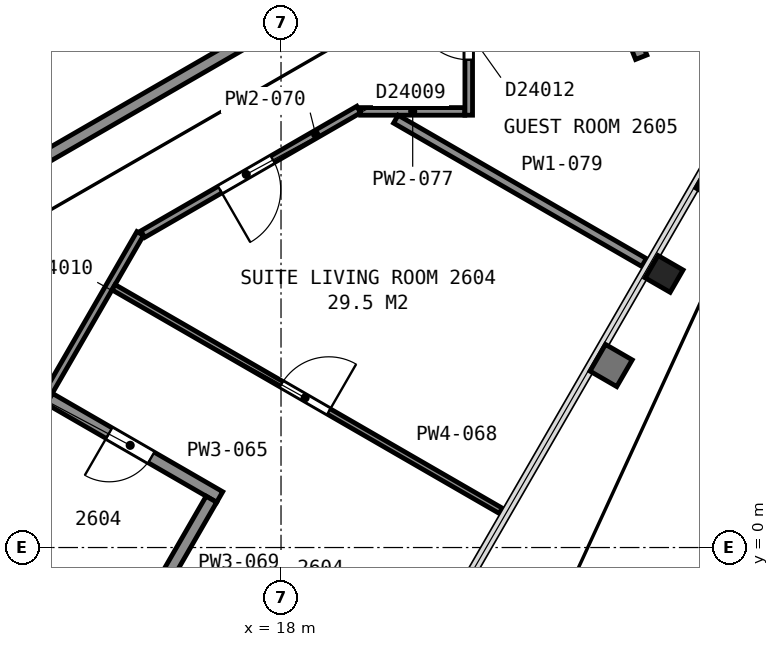
"""IFC4 building model, lengths in metres.
Left out: names, types, materials, properties, quantities, classifications, styles, units other than length and angle.
Written with IfcOpenShell. Run it as: python <this file> out.ifc"""

import sys

from ifc_helpers import new_model, si_unit, direction, frame, frame_2d, origin, origin_2d, place, context, subcontext, project, spatial, rectangle, i_section, extrude, element, fill, save


model = new_model("IFC4")
c1 = context("Model", 3, precision=1e-05, world=origin(), true_north=direction((0.0, 1.0)))
c2 = subcontext(c1, "Body", "Model", "MODEL_VIEW")
j1 = project(units=[si_unit("LENGTHUNIT", "METRE"), si_unit("PLANEANGLEUNIT", "RADIAN")], contexts=[c1])
p1 = place(None, origin())
s1 = spatial("IfcSite", under=j1, at=p1, CompositionType="ELEMENT")
p2 = place(p1, origin())
s2 = spatial("IfcBuilding", under=s1, at=p2, CompositionType="ELEMENT")
p3 = place(p2, frame((0.0, 0.0, 110.8)))
s3 = spatial("IfcBuildingStorey", under=s2, at=p3, CompositionType="ELEMENT", Elevation=110.8)
p4 = place(p3, frame((24.3, 4.5, 0.0), z_axis=(0.0, 0.0, 1.0), x_axis=(-0.5, -0.866025403784, 0.0)))
e1 = element("IfcColumn", 1, at=p4, inside=s3, PredefinedType="COLUMN", context=c2, shape_type="SweptSolid", body=[
    extrude(i_section(OverallWidth=0.424, OverallDepth=0.475, WebThickness=0.048, FlangeThickness=0.077, FilletRadius=0.015, at=origin_2d()), origin(), (0.0, 0.0, 1.0), 3.6),
])
for number, where, z_axis, x_axis in (
    (2, (6.178, 5.299, 0.0), (0.0, 0.0, 1.0), (0.866, 0.5, 0.0)),
    (3, (7.678, 2.701, 0.0), (0.0, 0.0, 1.0), (0.866, 0.5, 0.0)),
):
    element("IfcWall", number, at=place(p3, frame(where, z_axis=z_axis, x_axis=x_axis)), inside=s3, PredefinedType="PARTITIONING", context=c2, shape_type="SweptSolid", body=[
        extrude(rectangle(XDim=12.0, YDim=0.2, at=frame_2d((6.0, 0.0))), origin(), (0.0, 0.0, 1.0), 3.35),
    ])
p5 = place(p3, frame((15.684, 5.165, 0.0), z_axis=(0.0, 0.0, 1.0), x_axis=(-0.500027787016, -0.866009360349, 0.0)))
e4 = element("IfcWall", 4, at=p5, inside=s3, PredefinedType="PARTITIONING", context=c2, shape_type="SweptSolid", body=[
    extrude(rectangle(XDim=23.856, YDim=0.125, at=frame_2d((11.928, 0.0))), origin(), (0.0, 0.0, 1.0), 2.613),
])
p6 = place(p5, frame((16.996, 0.0, 0.0)))
e5 = element("IfcOpeningElement", 5, at=p6, cuts=e4, PredefinedType="OPENING", context=c2, shape_type="SweptSolid", body=[
    extrude(rectangle(XDim=1.0, YDim=2.1, at=frame_2d((0.5, 1.05))), frame((0.0, 0.073, 0.0), z_axis=(0.0, -1.0, 0.0), x_axis=(1.0, 0.0, 0.0)), (0.0, 0.0, 1.0), 0.145),
])
p7 = place(p5, frame((12.28, 0.0, 0.0)))
e6 = element("IfcOpeningElement", 6, at=p7, cuts=e4, PredefinedType="OPENING", context=c2, shape_type="SweptSolid", body=[
    extrude(rectangle(XDim=1.0, YDim=2.1, at=frame_2d((0.5, 1.05))), frame((0.0, 0.073, 0.0), z_axis=(0.0, -1.0, 0.0), x_axis=(1.0, 0.0, 0.0)), (0.0, 0.0, 1.0), 0.145),
])
p8 = place(p3, frame((12.893, 0.195, 0.0), z_axis=(0.0, 0.0, 1.0), x_axis=(0.865995225926, -0.500052265941, 0.0)))
e7 = element("IfcWall", 7, at=p8, inside=s3, PredefinedType="PARTITIONING", context=c2, shape_type="SweptSolid", body=[
    extrude(rectangle(XDim=7.347, YDim=0.15, at=frame_2d((3.674, 0.0))), origin(), (0.0, 0.0, 1.0), 2.613),
])
p9 = place(p3, frame((16.992, 0.831, 0.0), z_axis=(0.0, 0.0, 1.0), x_axis=(-0.866022073929, 0.500005767435, 0.0)))
e8 = element("IfcWall", 8, at=p9, inside=s3, PredefinedType="PARTITIONING", context=c2, shape_type="SweptSolid", body=[
    extrude(rectangle(XDim=3.232, YDim=0.2, at=frame_2d((1.616, 0.0))), origin(), (0.0, 0.0, 1.0), 2.613),
])
p10 = place(p9, frame((1.3, 0.0, 0.0)))
e9 = element("IfcOpeningElement", 9, at=p10, cuts=e8, PredefinedType="OPENING", context=c2, shape_type="SweptSolid", body=[
    extrude(rectangle(XDim=0.8, YDim=2.1, at=frame_2d((0.4, 1.05))), frame((0.0, 0.11, 0.0), z_axis=(0.0, -1.0, 0.0), x_axis=(1.0, 0.0, 0.0)), (0.0, 0.0, 1.0), 0.22),
])
p11 = place(p3, frame((21.613, 0.605, 0.0), z_axis=(0.0, 0.0, 1.0), x_axis=(-0.866021344046, 0.500007031608, 0.0)))
e10 = element("IfcWall", 10, at=p11, inside=s3, PredefinedType="PARTITIONING", context=c2, shape_type="SweptSolid", body=[
    extrude(rectangle(XDim=7.352, YDim=0.1, at=frame_2d((3.676, 0.0))), origin(), (0.0, 0.0, 1.0), 2.613),
])
p12 = place(p11, frame((3.264, 0.0, 0.0)))
e11 = element("IfcOpeningElement", 11, at=p12, cuts=e10, PredefinedType="OPENING", context=c2, shape_type="SweptSolid", body=[
    extrude(rectangle(XDim=0.9, YDim=2.1, at=frame_2d((0.45, 1.05))), frame((0.0, 0.06, 0.0), z_axis=(0.0, -1.0, 0.0), x_axis=(1.0, 0.0, 0.0)), (0.0, 0.0, 1.0), 0.12),
])
p13 = place(p3, frame((15.646, -1.302, 0.0), z_axis=(0.0, 0.0, 1.0), x_axis=(0.499719542643, 0.866187265377, 0.0)))
e12 = element("IfcWall", 12, at=p13, inside=s3, PredefinedType="PARTITIONING", context=c2, shape_type="SweptSolid", body=[
    extrude(rectangle(XDim=2.42, YDim=0.2, at=frame_2d((1.21, 0.0))), origin(), (0.0, 0.0, 1.0), 2.613),
])
p14 = place(p3, frame((19.278, 7.204, 0.0), z_axis=(0.0, 0.0, 1.0), x_axis=(-0.865992261418, -0.50005739987, 0.0)))
e13 = element("IfcWall", 13, at=p14, inside=s3, PredefinedType="PARTITIONING", context=c2, shape_type="SweptSolid", body=[
    extrude(rectangle(XDim=4.101, YDim=0.125, at=frame_2d((2.051, 0.0))), origin(), (0.0, 0.0, 1.0), 2.613),
])
p15 = place(p14, frame((1.636, 0.0, 0.0)))
e14 = element("IfcOpeningElement", 14, at=p15, cuts=e13, PredefinedType="OPENING", context=c2, shape_type="SweptSolid", body=[
    extrude(rectangle(XDim=1.0, YDim=2.1, at=frame_2d((0.5, 1.05))), frame((0.0, 0.073, 0.0), z_axis=(0.0, -1.0, 0.0), x_axis=(1.0, 0.0, 0.0)), (0.0, 0.0, 1.0), 0.145),
])
p16 = place(p3, frame((19.309, 7.173, 0.0), z_axis=(0.0, 0.0, 1.0), x_axis=(1.0, 0.0, 0.0)))
e15 = element("IfcWall", 15, at=p16, inside=s3, PredefinedType="PARTITIONING", context=c2, shape_type="SweptSolid", body=[
    extrude(rectangle(XDim=1.713, YDim=0.125, at=frame_2d((0.856, 0.0))), origin(), (0.0, 0.0, 1.0), 2.613),
])
p17 = place(p3, frame((19.889, 7.046, 0.0), z_axis=(0.0, 0.0, 1.0), x_axis=(0.865929380849, -0.500166279733, 0.0)))
e16 = element("IfcWall", 16, at=p17, inside=s3, PredefinedType="PARTITIONING", context=c2, shape_type="SweptSolid", body=[
    extrude(rectangle(XDim=4.714, YDim=0.15, at=frame_2d((2.357, 0.0))), origin(), (0.0, 0.0, 1.0), 2.613),
])
p18 = place(p3, frame((21.087, 10.209, 0.0), z_axis=(0.0, 0.0, 1.0), x_axis=(0.0, -1.0, 0.0)))
e17 = element("IfcWall", 17, at=p18, inside=s3, PredefinedType="PARTITIONING", context=c2, shape_type="SweptSolid", body=[
    extrude(rectangle(XDim=3.099, YDim=0.125, at=frame_2d((1.549, 0.0))), origin(), (0.0, 0.0, 1.0), 2.613),
])
p19 = place(p18, frame((1.287, 0.0, 0.0)))
e18 = element("IfcOpeningElement", 18, at=p19, cuts=e17, PredefinedType="OPENING", context=c2, shape_type="SweptSolid", body=[
    extrude(rectangle(XDim=0.9, YDim=2.1, at=frame_2d((0.45, 1.05))), frame((0.0, 0.073, 0.0), z_axis=(0.0, -1.0, 0.0), x_axis=(1.0, 0.0, 0.0)), (0.0, 0.0, 1.0), 0.145),
])
p20 = place(p3, frame((22.677, 11.22, 0.0), z_axis=(0.0, 0.0, 1.0), x_axis=(0.36751707294, -0.930016774632, 0.0)))
e19 = element("IfcWall", 19, at=p20, inside=s3, PredefinedType="PARTITIONING", context=c2, shape_type="SweptSolid", body=[
    extrude(rectangle(XDim=3.393, YDim=0.2, at=frame_2d((1.697, 0.0))), origin(), (0.0, 0.0, 1.0), 2.613),
])
p21 = place(p10, origin())
e20 = element("IfcDoor", 20, at=p21, inside=s3, OperationType="SINGLE_SWING_RIGHT", PredefinedType="DOOR", context=c2, shape_type="SweptSolid", body=[
    extrude(rectangle(XDim=0.8, YDim=2.1, at=frame_2d((0.4, 1.05))), frame((0.0, 0.025, 0.0), z_axis=(0.0, -1.0, 0.0), x_axis=(1.0, 0.0, 0.0)), (0.0, 0.0, 1.0), 0.05),
])
fill(e9, e20)
p22 = place(p12, origin())
e21 = element("IfcDoor", 21, at=p22, inside=s3, OperationType="SINGLE_SWING_LEFT", PredefinedType="DOOR", context=c2, shape_type="SweptSolid", body=[
    extrude(rectangle(XDim=0.9, YDim=2.1, at=frame_2d((0.45, 1.05))), frame((0.0, 0.025, 0.0), z_axis=(0.0, -1.0, 0.0), x_axis=(1.0, 0.0, 0.0)), (0.0, 0.0, 1.0), 0.05),
])
fill(e11, e21)
p23 = place(p15, origin())
e22 = element("IfcDoor", 22, at=p23, inside=s3, OperationType="SINGLE_SWING_RIGHT", PredefinedType="DOOR", context=c2, shape_type="SweptSolid", body=[
    extrude(rectangle(XDim=1.0, YDim=2.1, at=frame_2d((0.5, 1.05))), frame((0.0, 0.025, 0.0), z_axis=(0.0, -1.0, 0.0), x_axis=(1.0, 0.0, 0.0)), (0.0, 0.0, 1.0), 0.05),
])
fill(e14, e22)
p24 = place(p19, origin())
e23 = element("IfcDoor", 23, at=p24, inside=s3, OperationType="SINGLE_SWING_LEFT", PredefinedType="DOOR", context=c2, shape_type="SweptSolid", body=[
    extrude(rectangle(XDim=0.9, YDim=2.1, at=frame_2d((0.45, 1.05))), frame((0.0, 0.025, 0.0), z_axis=(0.0, -1.0, 0.0), x_axis=(1.0, 0.0, 0.0)), (0.0, 0.0, 1.0), 0.05),
])
fill(e18, e23)
save(model, sys.argv[1])
